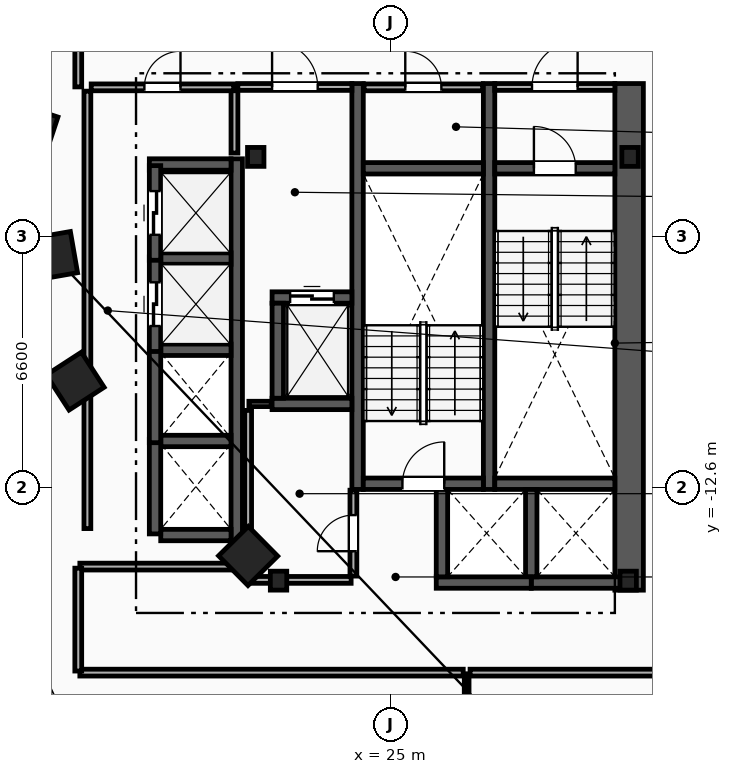
"""IFC4 building model, lengths in metres.
Left out: names, types, materials, properties, quantities, classifications, styles, units other than length and angle.
Written with IfcOpenShell. Run it as: python <this file> out.ifc"""

import sys

from ifc_helpers import new_model, si_unit, direction, frame, frame_2d, origin, origin_2d, place, context, subcontext, project, spatial, rectangle, i_section, extrude, element, fill, save


model = new_model("IFC4")
c1 = context("Model", 3, precision=1e-05, world=origin(), true_north=direction((0.0, 1.0)))
c2 = subcontext(c1, "Body", "Model", "MODEL_VIEW")
j1 = project(units=[si_unit("LENGTHUNIT", "METRE"), si_unit("PLANEANGLEUNIT", "RADIAN")], contexts=[c1])
p1 = place(None, origin())
s1 = spatial("IfcSite", under=j1, at=p1, CompositionType="ELEMENT")
p2 = place(p1, origin())
s2 = spatial("IfcBuilding", under=s1, at=p2, CompositionType="ELEMENT")
p3 = place(p2, frame((0.0, 0.0, 110.6)))
s3 = spatial("IfcBuildingStorey", under=s2, at=p3, CompositionType="ELEMENT", Elevation=110.6)
for number, where, z_axis, x_axis in (
    (1, (31.3, -3.9, 0.0), (0.0, 0.0, 1.0), (1.0, 0.0, 0.0)),
    (2, (21.45, -3.9, 0.0), (0.0, 0.0, 1.0), (1.0, 0.0, 0.0)),
    (3, (22.05, -15.05, 0.0), (0.0, 0.0, 1.0), (1.0, 0.0, 0.0)),
    (4, (31.25, -15.05, 0.0), (0.0, 0.0, 1.0), (1.0, 0.0, 0.0)),
):
    element("IfcColumn", number, at=place(p3, frame(where, z_axis=z_axis, x_axis=x_axis)), inside=s3, PredefinedType="COLUMN", context=c2, shape_type="SweptSolid", body=[
        extrude(i_section(OverallWidth=0.432, OverallDepth=0.498, WebThickness=0.056, FlangeThickness=0.089, FilletRadius=0.018, at=origin_2d()), origin(), (0.0, 0.0, 1.0), 3.6),
    ])
for number, where, z_axis, x_axis in (
    (5, (15.55, -3.2, 0.0), (0.0, 0.0, 1.0), (-0.315, -0.949, 0.0)),
    (6, (16.125, -6.5, 0.0), (0.0, 0.0, 1.0), (0.172, -0.985, 0.0)),
    (7, (16.7, -9.8, 0.0), (0.0, 0.0, 1.0), (0.544, -0.839, 0.0)),
    (8, (21.25, -14.4, 0.0), (0.0, 0.0, 1.0), (0.703, -0.711, 0.0)),
):
    element("IfcColumn", number, at=place(p3, frame(where, z_axis=z_axis, x_axis=x_axis)), inside=s3, PredefinedType="COLUMN", context=c2, shape_type="SweptSolid", body=[
        extrude(rectangle(XDim=1.1, YDim=1.1, at=origin_2d()), origin(), (0.0, 0.0, 1.0), 3.6),
    ])
p4 = place(p3, frame((31.275, -15.3, 0.0), z_axis=(0.0, 0.0, 1.0), x_axis=(0.0, 1.0, 0.0)))
e9 = element("IfcWall", 9, at=p4, inside=s3, PredefinedType="SHEAR", context=c2, shape_type="SweptSolid", body=[
    extrude(rectangle(XDim=13.33, YDim=0.75, at=frame_2d((6.665, 0.0))), origin(), (0.0, 0.0, 1.0), 3.3),
])
for number, where, z_axis, x_axis in (
    (10, (27.59, -12.65, 0.0), (0.0, 0.0, 1.0), (0.0, 1.0, 0.0)),
    (11, (24.13, -12.65, 0.0), (0.0, 0.0, 1.0), (0.0, 1.0, 0.0)),
):
    element("IfcWall", number, at=place(p3, frame(where, z_axis=z_axis, x_axis=x_axis)), inside=s3, PredefinedType="SHEAR", context=c2, shape_type="SweptSolid", body=[
        extrude(rectangle(XDim=10.68, YDim=0.3, at=frame_2d((5.34, 0.0))), origin(), (0.0, 0.0, 1.0), 3.3),
    ])
p5 = place(p3, frame((27.74, -4.2, 0.0), z_axis=(0.0, 0.0, 1.0), x_axis=(1.0, 0.0, 0.0)))
e12 = element("IfcWall", 12, at=p5, inside=s3, PredefinedType="SHEAR", context=c2, shape_type="SweptSolid", body=[
    extrude(rectangle(XDim=3.16, YDim=0.3, at=frame_2d((1.58, 0.0))), origin(), (0.0, 0.0, 1.0), 3.3),
])
p6 = place(p5, frame((1.03, 0.0, 0.0)))
e13 = element("IfcOpeningElement", 13, at=p6, cuts=e12, PredefinedType="OPENING", context=c2, shape_type="SweptSolid", body=[
    extrude(rectangle(XDim=1.1, YDim=2.15, at=frame_2d((0.55, 1.075))), frame((0.0, 0.16, 0.0), z_axis=(0.0, -1.0, 0.0), x_axis=(1.0, 0.0, 0.0)), (0.0, 0.0, 1.0), 0.32),
])
p7 = place(p3, frame((27.74, -12.5, 0.0), z_axis=(0.0, 0.0, 1.0), x_axis=(1.0, 0.0, 0.0)))
e14 = element("IfcWall", 14, at=p7, inside=s3, PredefinedType="SHEAR", context=c2, shape_type="SweptSolid", body=[
    extrude(rectangle(XDim=3.16, YDim=0.3, at=frame_2d((1.58, 0.0))), origin(), (0.0, 0.0, 1.0), 3.3),
])
p8 = place(p3, frame((24.28, -12.5, 0.0), z_axis=(0.0, 0.0, 1.0), x_axis=(1.0, 0.0, 0.0)))
e15 = element("IfcWall", 15, at=p8, inside=s3, PredefinedType="SHEAR", context=c2, shape_type="SweptSolid", body=[
    extrude(rectangle(XDim=3.16, YDim=0.3, at=frame_2d((1.58, 0.0))), origin(), (0.0, 0.0, 1.0), 3.3),
])
p9 = place(p8, frame((1.03, 0.0, 0.0)))
e16 = element("IfcOpeningElement", 16, at=p9, cuts=e15, PredefinedType="OPENING", context=c2, shape_type="SweptSolid", body=[
    extrude(rectangle(XDim=1.1, YDim=2.15, at=frame_2d((0.55, 1.075))), frame((0.0, 0.16, 0.0), z_axis=(0.0, -1.0, 0.0), x_axis=(1.0, 0.0, 0.0)), (0.0, 0.0, 1.0), 0.32),
])
p10 = place(p3, frame((24.28, -4.2, 0.0), z_axis=(0.0, 0.0, 1.0), x_axis=(1.0, 0.0, 0.0)))
e17 = element("IfcWall", 17, at=p10, inside=s3, PredefinedType="SHEAR", context=c2, shape_type="SweptSolid", body=[
    extrude(rectangle(XDim=3.16, YDim=0.3, at=frame_2d((1.58, 0.0))), origin(), (0.0, 0.0, 1.0), 3.3),
])
p11 = place(p3, frame((20.89, -3.8, 0.0), z_axis=(0.0, 0.0, 1.0), x_axis=(0.0, 1.0, 0.0)))
e18 = element("IfcWall", 18, at=p11, inside=s3, PredefinedType="PARTITIONING", context=c2, shape_type="SweptSolid", body=[
    extrude(rectangle(XDim=1.65, YDim=0.18, at=frame_2d((0.825, 0.0))), origin(), (0.0, 0.0, 1.0), 3.3),
])
p12 = place(p3, frame((20.98, -2.06, 0.0), z_axis=(0.0, 0.0, 1.0), x_axis=(1.0, 0.0, 0.0)))
e19 = element("IfcWall", 19, at=p12, inside=s3, PredefinedType="PARTITIONING", context=c2, shape_type="SweptSolid", body=[
    extrude(rectangle(XDim=3.0, YDim=0.18, at=frame_2d((1.5, 0.0))), origin(), (0.0, 0.0, 1.0), 3.3),
])
p13 = place(p12, frame((0.9, 0.0, 0.0)))
e20 = element("IfcOpeningElement", 20, at=p13, cuts=e19, PredefinedType="OPENING", context=c2, shape_type="SweptSolid", body=[
    extrude(rectangle(XDim=1.2, YDim=2.15, at=frame_2d((0.6, 1.075))), frame((0.0, 0.1, 0.0), z_axis=(0.0, -1.0, 0.0), x_axis=(1.0, 0.0, 0.0)), (0.0, 0.0, 1.0), 0.2),
])
p14 = place(p3, frame((27.74, -2.06, 0.0), z_axis=(0.0, 0.0, 1.0), x_axis=(1.0, 0.0, 0.0)))
e21 = element("IfcWall", 21, at=p14, inside=s3, PredefinedType="PARTITIONING", context=c2, shape_type="SweptSolid", body=[
    extrude(rectangle(XDim=3.16, YDim=0.18, at=frame_2d((1.58, 0.0))), origin(), (0.0, 0.0, 1.0), 3.3),
])
p15 = place(p14, frame((0.98, 0.0, 0.0)))
e22 = element("IfcOpeningElement", 22, at=p15, cuts=e21, PredefinedType="OPENING", context=c2, shape_type="SweptSolid", body=[
    extrude(rectangle(XDim=1.2, YDim=2.15, at=frame_2d((0.6, 1.075))), frame((0.0, 0.1, 0.0), z_axis=(0.0, -1.0, 0.0), x_axis=(1.0, 0.0, 0.0)), (0.0, 0.0, 1.0), 0.2),
])
p16 = place(p3, frame((21.88, -7.6, 0.0), z_axis=(0.0, 0.0, 1.0), x_axis=(1.0, 0.0, 0.0)))
e23 = element("IfcWall", 23, at=p16, inside=s3, PredefinedType="SHEAR", context=c2, shape_type="SweptSolid", body=[
    extrude(rectangle(XDim=2.1, YDim=0.3, at=frame_2d((1.05, 0.0))), origin(), (0.0, 0.0, 1.0), 3.3),
])
p17 = place(p16, frame((0.475, 0.0, 0.0)))
e24 = element("IfcOpeningElement", 24, at=p17, cuts=e23, PredefinedType="OPENING", context=c2, shape_type="SweptSolid", body=[
    extrude(rectangle(XDim=1.15, YDim=2.2, at=frame_2d((0.575, 1.1))), frame((0.0, 0.16, 0.0), z_axis=(0.0, -1.0, 0.0), x_axis=(1.0, 0.0, 0.0)), (0.0, 0.0, 1.0), 0.32),
])
p18 = place(p3, frame((21.88, -10.4, 0.0), z_axis=(0.0, 0.0, 1.0), x_axis=(1.0, 0.0, 0.0)))
e25 = element("IfcWall", 25, at=p18, inside=s3, PredefinedType="SHEAR", context=c2, shape_type="SweptSolid", body=[
    extrude(rectangle(XDim=2.1, YDim=0.3, at=frame_2d((1.05, 0.0))), origin(), (0.0, 0.0, 1.0), 3.3),
])
for number, where, z_axis, x_axis in (
    (26, (22.03, -10.25, 0.0), (0.0, 0.0, 1.0), (0.0, 1.0, 0.0)),
    (27, (28.7, -15.1, 0.0), (0.0, 0.0, 1.0), (1.0, 0.0, 0.0)),
):
    element("IfcWall", number, at=place(p3, frame(where, z_axis=z_axis, x_axis=x_axis)), inside=s3, PredefinedType="SHEAR", context=c2, shape_type="SweptSolid", body=[
        extrude(rectangle(XDim=2.5, YDim=0.3, at=frame_2d((1.25, 0.0))), origin(), (0.0, 0.0, 1.0), 3.3),
    ])
p19 = place(p3, frame((28.7, -14.95, 0.0), z_axis=(0.0, 0.0, 1.0), x_axis=(0.0, 1.0, 0.0)))
e28 = element("IfcWall", 28, at=p19, inside=s3, PredefinedType="SHEAR", context=c2, shape_type="SweptSolid", body=[
    extrude(rectangle(XDim=2.3, YDim=0.3, at=frame_2d((1.15, 0.0))), origin(), (0.0, 0.0, 1.0), 3.3),
])
p20 = place(p3, frame((26.2, -15.1, 0.0), z_axis=(0.0, 0.0, 1.0), x_axis=(1.0, 0.0, 0.0)))
e29 = element("IfcWall", 29, at=p20, inside=s3, PredefinedType="SHEAR", context=c2, shape_type="SweptSolid", body=[
    extrude(rectangle(XDim=2.5, YDim=0.3, at=frame_2d((1.25, 0.0))), origin(), (0.0, 0.0, 1.0), 3.3),
])
p21 = place(p3, frame((26.35, -14.95, 0.0), z_axis=(0.0, 0.0, 1.0), x_axis=(0.0, 1.0, 0.0)))
e30 = element("IfcWall", 30, at=p21, inside=s3, PredefinedType="SHEAR", context=c2, shape_type="SweptSolid", body=[
    extrude(rectangle(XDim=2.3, YDim=0.3, at=frame_2d((1.15, 0.0))), origin(), (0.0, 0.0, 1.0), 3.3),
])
p22 = place(p3, frame((20.95, -14.0, 0.0), z_axis=(0.0, 0.0, 1.0), x_axis=(0.0, 1.0, 0.0)))
e31 = element("IfcWall", 31, at=p22, inside=s3, PredefinedType="SHEAR", context=c2, shape_type="SweptSolid", body=[
    extrude(rectangle(XDim=10.05, YDim=0.3, at=frame_2d((5.025, 0.0))), origin(), (0.0, 0.0, 1.0), 3.3),
])
p23 = place(p3, frame((18.95, -13.85, 0.0), z_axis=(0.0, 0.0, 1.0), x_axis=(1.0, 0.0, 0.0)))
e32 = element("IfcWall", 32, at=p23, inside=s3, PredefinedType="SHEAR", context=c2, shape_type="SweptSolid", body=[
    extrude(rectangle(XDim=1.85, YDim=0.3, at=frame_2d((0.925, 0.0))), origin(), (0.0, 0.0, 1.0), 3.3),
])
p24 = place(p3, frame((18.65, -4.1, 0.0), z_axis=(0.0, 0.0, 1.0), x_axis=(1.0, 0.0, 0.0)))
e33 = element("IfcWall", 33, at=p24, inside=s3, PredefinedType="SHEAR", context=c2, shape_type="SweptSolid", body=[
    extrude(rectangle(XDim=2.15, YDim=0.3, at=frame_2d((1.075, 0.0))), origin(), (0.0, 0.0, 1.0), 3.3),
])
for number, where, z_axis, x_axis in (
    (34, (18.95, -11.375, 0.0), (0.0, 0.0, 1.0), (1.0, 0.0, 0.0)),
    (35, (18.95, -8.975, 0.0), (0.0, 0.0, 1.0), (1.0, 0.0, 0.0)),
    (36, (18.95, -6.575, 0.0), (0.0, 0.0, 1.0), (1.0, 0.0, 0.0)),
):
    element("IfcWall", number, at=place(p3, frame(where, z_axis=z_axis, x_axis=x_axis)), inside=s3, PredefinedType="SHEAR", context=c2, shape_type="SweptSolid", body=[
        extrude(rectangle(XDim=1.85, YDim=0.3, at=frame_2d((0.925, 0.0))), origin(), (0.0, 0.0, 1.0), 3.3),
    ])
for number, where, z_axis, x_axis in (
    (37, (18.8, -13.82, 0.0), (0.0, 0.0, 1.0), (0.0, 1.0, 0.0)),
    (38, (18.8, -11.42, 0.0), (0.0, 0.0, 1.0), (0.0, 1.0, 0.0)),
):
    element("IfcWall", number, at=place(p3, frame(where, z_axis=z_axis, x_axis=x_axis)), inside=s3, PredefinedType="SHEAR", context=c2, shape_type="SweptSolid", body=[
        extrude(rectangle(XDim=2.49, YDim=0.3, at=frame_2d((1.245, 0.0))), origin(), (0.0, 0.0, 1.0), 3.3),
    ])
p25 = place(p3, frame((18.8, -9.02, 0.0), z_axis=(0.0, 0.0, 1.0), x_axis=(0.0, 1.0, 0.0)))
e39 = element("IfcWall", 39, at=p25, inside=s3, PredefinedType="SHEAR", context=c2, shape_type="SweptSolid", body=[
    extrude(rectangle(XDim=2.49, YDim=0.3, at=frame_2d((1.245, 0.0))), origin(), (0.0, 0.0, 1.0), 3.3),
])
p26 = place(p25, frame((0.67, 0.0, 0.0)))
e40 = element("IfcOpeningElement", 40, at=p26, cuts=e39, PredefinedType="OPENING", context=c2, shape_type="SweptSolid", body=[
    extrude(rectangle(XDim=1.15, YDim=2.2, at=frame_2d((0.575, 1.1))), frame((0.0, 0.16, 0.0), z_axis=(0.0, -1.0, 0.0), x_axis=(1.0, 0.0, 0.0)), (0.0, 0.0, 1.0), 0.32),
])
p27 = place(p3, frame((18.8, -6.62, 0.0), z_axis=(0.0, 0.0, 1.0), x_axis=(0.0, 1.0, 0.0)))
e41 = element("IfcWall", 41, at=p27, inside=s3, PredefinedType="SHEAR", context=c2, shape_type="SweptSolid", body=[
    extrude(rectangle(XDim=2.49, YDim=0.3, at=frame_2d((1.245, 0.0))), origin(), (0.0, 0.0, 1.0), 3.3),
])
p28 = place(p27, frame((0.67, 0.0, 0.0)))
e42 = element("IfcOpeningElement", 42, at=p28, cuts=e41, PredefinedType="OPENING", context=c2, shape_type="SweptSolid", body=[
    extrude(rectangle(XDim=1.15, YDim=2.2, at=frame_2d((0.575, 1.1))), frame((0.0, 0.16, 0.0), z_axis=(0.0, -1.0, 0.0), x_axis=(1.0, 0.0, 0.0)), (0.0, 0.0, 1.0), 0.32),
])
p29 = place(p3, frame((17.02, -13.68, 0.0), z_axis=(0.0, 0.0, 1.0), x_axis=(0.0, 1.0, 0.0)))
e43 = element("IfcWall", 43, at=p29, inside=s3, PredefinedType="PARTITIONING", context=c2, shape_type="SweptSolid", body=[
    extrude(rectangle(XDim=11.51, YDim=0.18, at=frame_2d((5.755, 0.0))), origin(), (0.0, 0.0, 1.0), 3.3),
])
p30 = place(p3, frame((17.12, -2.07, 0.0), z_axis=(0.0, 0.0, 1.0), x_axis=(1.0, 0.0, 0.0)))
e44 = element("IfcWall", 44, at=p30, inside=s3, PredefinedType="PARTITIONING", context=c2, shape_type="SweptSolid", body=[
    extrude(rectangle(XDim=3.75, YDim=0.18, at=frame_2d((1.875, 0.0))), origin(), (0.0, 0.0, 1.0), 3.3),
])
p31 = place(p30, frame((1.4, 0.0, 0.0)))
e45 = element("IfcOpeningElement", 45, at=p31, cuts=e44, PredefinedType="OPENING", context=c2, shape_type="SweptSolid", body=[
    extrude(rectangle(XDim=0.95, YDim=2.1, at=frame_2d((0.475, 1.05))), frame((0.0, 0.1, 0.0), z_axis=(0.0, -1.0, 0.0), x_axis=(1.0, 0.0, 0.0)), (0.0, 0.0, 1.0), 0.2),
])
p32 = place(p3, frame((21.27, -10.4, 0.0), z_axis=(0.0, 0.0, 1.0), x_axis=(1.0, 0.0, 0.0)))
e46 = element("IfcWall", 46, at=p32, inside=s3, PredefinedType="PARTITIONING", context=c2, shape_type="SweptSolid", body=[
    extrude(rectangle(XDim=0.59, YDim=0.14, at=frame_2d((0.295, 0.0))), origin(), (0.0, 0.0, 1.0), 3.3),
])
p33 = place(p3, frame((21.25, -14.93, 0.0), z_axis=(0.0, 0.0, 1.0), x_axis=(0.0, 1.0, 0.0)))
e47 = element("IfcWall", 47, at=p33, inside=s3, PredefinedType="PARTITIONING", context=c2, shape_type="SweptSolid", body=[
    extrude(rectangle(XDim=4.36, YDim=0.18, at=frame_2d((2.18, 0.0))), origin(), (0.0, 0.0, 1.0), 3.3),
])
p34 = place(p3, frame((21.35, -15.03, 0.0), z_axis=(0.0, 0.0, 1.0), x_axis=(1.0, 0.0, 0.0)))
e48 = element("IfcWall", 48, at=p34, inside=s3, PredefinedType="PARTITIONING", context=c2, shape_type="SweptSolid", body=[
    extrude(rectangle(XDim=2.61, YDim=0.18, at=frame_2d((1.305, 0.0))), origin(), (0.0, 0.0, 1.0), 2.373),
])
p35 = place(p3, frame((24.3, -2.07, 0.0), z_axis=(0.0, 0.0, 1.0), x_axis=(1.0, 0.0, 0.0)))
e49 = element("IfcWall", 49, at=p35, inside=s3, PredefinedType="PARTITIONING", context=c2, shape_type="SweptSolid", body=[
    extrude(rectangle(XDim=3.12, YDim=0.18, at=frame_2d((1.56, 0.0))), origin(), (0.0, 0.0, 1.0), 3.3),
])
p36 = place(p35, frame((1.085, 0.0, 0.0)))
e50 = element("IfcOpeningElement", 50, at=p36, cuts=e49, PredefinedType="OPENING", context=c2, shape_type="SweptSolid", body=[
    extrude(rectangle(XDim=0.95, YDim=2.1, at=frame_2d((0.475, 1.05))), frame((0.0, 0.1, 0.0), z_axis=(0.0, -1.0, 0.0), x_axis=(1.0, 0.0, 0.0)), (0.0, 0.0, 1.0), 0.2),
])
p37 = place(p3, frame((24.02, -14.93, 0.0), z_axis=(0.0, 0.0, 1.0), x_axis=(0.0, 1.0, 0.0)))
e51 = element("IfcWall", 51, at=p37, inside=s3, PredefinedType="PARTITIONING", context=c2, shape_type="SweptSolid", body=[
    extrude(rectangle(XDim=2.26, YDim=0.18, at=frame_2d((1.13, 0.0))), origin(), (0.0, 0.0, 1.0), 3.3),
])
p38 = place(p37, frame((0.655, 0.0, 0.0)))
e52 = element("IfcOpeningElement", 52, at=p38, cuts=e51, PredefinedType="OPENING", context=c2, shape_type="SweptSolid", body=[
    extrude(rectangle(XDim=0.95, YDim=2.1, at=frame_2d((0.475, 1.05))), frame((0.0, 0.1, 0.0), z_axis=(0.0, -1.0, 0.0), x_axis=(1.0, 0.0, 0.0)), (0.0, 0.0, 1.0), 0.2),
])
p39 = place(p3, frame((27.0, -25.404, 0.0), z_axis=(0.0, 0.0, 1.0), x_axis=(0.0, 1.0, 0.0)))
e53 = element("IfcWall", 53, at=p39, inside=s3, PredefinedType="PARTITIONING", context=c2, shape_type="SweptSolid", body=[
    extrude(rectangle(XDim=7.904, YDim=0.125, at=frame_2d((3.952, 0.0))), origin(), (0.0, 0.0, 1.0), 3.3),
])
p40 = place(p3, frame((27.09, -17.47, 0.0), z_axis=(0.0, 0.0, 1.0), x_axis=(1.0, 0.0, 0.0)))
e54 = element("IfcWall", 54, at=p40, inside=s3, PredefinedType="PARTITIONING", context=c2, shape_type="SweptSolid", body=[
    extrude(rectangle(XDim=6.538, YDim=0.18, at=frame_2d((3.269, 0.0))), origin(), (0.0, 0.0, 1.0), 3.3),
])
p41 = place(p3, frame((16.822, -17.47, 0.0), z_axis=(0.0, 0.0, 1.0), x_axis=(1.0, 0.0, 0.0)))
e55 = element("IfcWall", 55, at=p41, inside=s3, PredefinedType="PARTITIONING", context=c2, shape_type="SweptSolid", body=[
    extrude(rectangle(XDim=10.088, YDim=0.18, at=frame_2d((5.044, 0.0))), origin(), (0.0, 0.0, 1.0), 3.3),
])
p42 = place(p3, frame((21.178, -14.68, 0.0), z_axis=(0.0, 0.0, 1.0), x_axis=(-1.0, 0.0, 0.0)))
e56 = element("IfcWall", 56, at=p42, inside=s3, PredefinedType="PARTITIONING", context=c2, shape_type="SweptSolid", body=[
    extrude(rectangle(XDim=4.357, YDim=0.18, at=frame_2d((2.178, 0.0))), origin(), (0.0, 0.0, 1.0), 3.3),
])
p43 = place(p3, frame((16.78, -14.721, 0.0), z_axis=(0.0, 0.0, 1.0), x_axis=(0.0, -1.0, 0.0)))
e57 = element("IfcWall", 57, at=p43, inside=s3, PredefinedType="PARTITIONING", context=c2, shape_type="SweptSolid", body=[
    extrude(rectangle(XDim=2.707, YDim=0.18, at=frame_2d((1.354, 0.0))), origin(), (0.0, 0.0, 1.0), 3.3),
])
p44 = place(p3, frame((16.78, 0.329, 0.0), z_axis=(0.0, 0.0, 1.0), x_axis=(0.0, -1.0, 0.0)))
e58 = element("IfcWall", 58, at=p44, inside=s3, PredefinedType="PARTITIONING", context=c2, shape_type="SweptSolid", body=[
    extrude(rectangle(XDim=2.387, YDim=0.18, at=frame_2d((1.194, 0.0))), origin(), (0.0, 0.0, 1.0), 3.3),
])
p45 = place(p6, origin())
e59 = element("IfcDoor", 59, at=p45, inside=s3, OperationType="SINGLE_SWING_LEFT", PredefinedType="DOOR", context=c2, shape_type="SweptSolid", body=[
    extrude(rectangle(XDim=1.1, YDim=2.15, at=frame_2d((0.55, 1.075))), frame((0.0, 0.025, 0.0), z_axis=(0.0, -1.0, 0.0), x_axis=(1.0, 0.0, 0.0)), (0.0, 0.0, 1.0), 0.05),
])
fill(e13, e59)
p46 = place(p9, origin())
e60 = element("IfcDoor", 60, at=p46, inside=s3, OperationType="SINGLE_SWING_RIGHT", PredefinedType="DOOR", context=c2, shape_type="SweptSolid", body=[
    extrude(rectangle(XDim=1.1, YDim=2.15, at=frame_2d((0.55, 1.075))), frame((0.0, 0.025, 0.0), z_axis=(0.0, -1.0, 0.0), x_axis=(1.0, 0.0, 0.0)), (0.0, 0.0, 1.0), 0.05),
])
fill(e16, e60)
p47 = place(p13, origin())
e61 = element("IfcDoor", 61, at=p47, inside=s3, OperationType="SINGLE_SWING_LEFT", PredefinedType="DOOR", context=c2, shape_type="SweptSolid", body=[
    extrude(rectangle(XDim=1.2, YDim=2.15, at=frame_2d((0.6, 1.075))), frame((0.0, 0.025, 0.0), z_axis=(0.0, -1.0, 0.0), x_axis=(1.0, 0.0, 0.0)), (0.0, 0.0, 1.0), 0.05),
])
fill(e20, e61)
p48 = place(p15, origin())
e62 = element("IfcDoor", 62, at=p48, inside=s3, OperationType="SINGLE_SWING_RIGHT", PredefinedType="DOOR", context=c2, shape_type="SweptSolid", body=[
    extrude(rectangle(XDim=1.2, YDim=2.15, at=frame_2d((0.6, 1.075))), frame((0.0, 0.025, 0.0), z_axis=(0.0, -1.0, 0.0), x_axis=(1.0, 0.0, 0.0)), (0.0, 0.0, 1.0), 0.05),
])
fill(e22, e62)
p49 = place(p17, origin())
e63 = element("IfcDoor", 63, at=p49, inside=s3, OperationType="SLIDING_TO_LEFT", PredefinedType="TRAPDOOR", context=c2, shape_type="SweptSolid", body=[
    extrude(rectangle(XDim=1.15, YDim=2.2, at=frame_2d((0.575, 1.1))), frame((0.0, 0.025, 0.0), z_axis=(0.0, -1.0, 0.0), x_axis=(1.0, 0.0, 0.0)), (0.0, 0.0, 1.0), 0.05),
])
fill(e24, e63)
p50 = place(p26, origin())
e64 = element("IfcDoor", 64, at=p50, inside=s3, OperationType="SLIDING_TO_LEFT", PredefinedType="TRAPDOOR", context=c2, shape_type="SweptSolid", body=[
    extrude(rectangle(XDim=1.15, YDim=2.2, at=frame_2d((0.575, 1.1))), frame((0.0, 0.025, 0.0), z_axis=(0.0, -1.0, 0.0), x_axis=(1.0, 0.0, 0.0)), (0.0, 0.0, 1.0), 0.05),
])
fill(e40, e64)
p51 = place(p28, origin())
e65 = element("IfcDoor", 65, at=p51, inside=s3, OperationType="SLIDING_TO_LEFT", PredefinedType="TRAPDOOR", context=c2, shape_type="SweptSolid", body=[
    extrude(rectangle(XDim=1.15, YDim=2.2, at=frame_2d((0.575, 1.1))), frame((0.0, 0.025, 0.0), z_axis=(0.0, -1.0, 0.0), x_axis=(1.0, 0.0, 0.0)), (0.0, 0.0, 1.0), 0.05),
])
fill(e42, e65)
p52 = place(p31, origin())
e66 = element("IfcDoor", 66, at=p52, inside=s3, OperationType="SINGLE_SWING_RIGHT", PredefinedType="DOOR", context=c2, shape_type="SweptSolid", body=[
    extrude(rectangle(XDim=0.95, YDim=2.1, at=frame_2d((0.475, 1.05))), frame((0.0, 0.025, 0.0), z_axis=(0.0, -1.0, 0.0), x_axis=(1.0, 0.0, 0.0)), (0.0, 0.0, 1.0), 0.05),
])
fill(e45, e66)
p53 = place(p36, origin())
e67 = element("IfcDoor", 67, at=p53, inside=s3, OperationType="SINGLE_SWING_LEFT", PredefinedType="DOOR", context=c2, shape_type="SweptSolid", body=[
    extrude(rectangle(XDim=0.95, YDim=2.1, at=frame_2d((0.475, 1.05))), frame((0.0, 0.025, 0.0), z_axis=(0.0, -1.0, 0.0), x_axis=(1.0, 0.0, 0.0)), (0.0, 0.0, 1.0), 0.05),
])
fill(e50, e67)
p54 = place(p38, origin())
e68 = element("IfcDoor", 68, at=p54, inside=s3, OperationType="SINGLE_SWING_LEFT", PredefinedType="DOOR", context=c2, shape_type="SweptSolid", body=[
    extrude(rectangle(XDim=0.95, YDim=2.1, at=frame_2d((0.475, 1.05))), frame((0.0, 0.025, 0.0), z_axis=(0.0, -1.0, 0.0), x_axis=(1.0, 0.0, 0.0)), (0.0, 0.0, 1.0), 0.05),
])
fill(e52, e68)
save(model, sys.argv[1])
